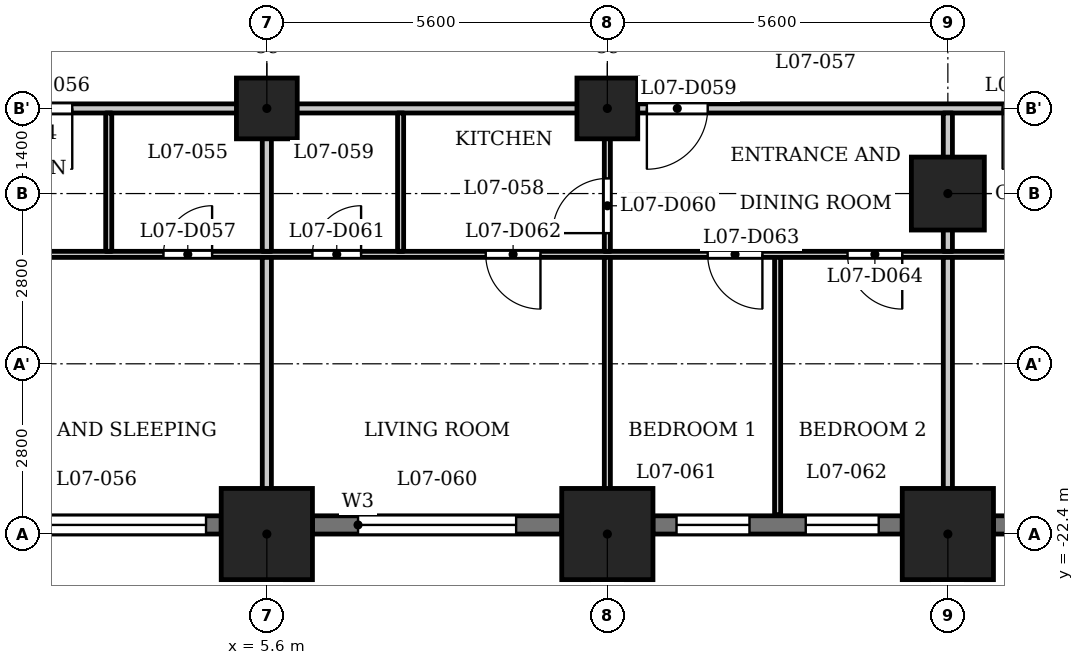
"""IFC4 building model, lengths in metres.
Left out: names, types, materials, properties, quantities, classifications, styles, units other than length and angle.
Written with IfcOpenShell. Run it as: python <this file> out.ifc"""

import sys

from ifc_helpers import new_model, si_unit, direction, frame, frame_2d, origin, origin_2d, place, context, subcontext, project, spatial, rectangle, extrude, element, fill, save


model = new_model("IFC4")
c1 = context("Model", 3, precision=1e-05, world=origin(), true_north=direction((0.0, 1.0)))
c2 = subcontext(c1, "Body", "Model", "MODEL_VIEW")
j1 = project(units=[si_unit("LENGTHUNIT", "METRE"), si_unit("PLANEANGLEUNIT", "RADIAN")], contexts=[c1])
p1 = place(None, origin())
s1 = spatial("IfcSite", under=j1, at=p1, CompositionType="ELEMENT")
p2 = place(p1, origin())
s2 = spatial("IfcBuilding", under=s1, at=p2, CompositionType="ELEMENT")
p3 = place(p2, frame((0.0, 0.0, 34.0)))
s3 = spatial("IfcBuildingStorey", under=s2, at=p3, CompositionType="ELEMENT", Elevation=34.0)
for number, where, z_axis, x_axis in (
    (1, (5.6, -22.4, 0.0), (0.0, 0.0, 1.0), (1.0, 0.0, 0.0)),
    (2, (11.2, -22.4, 0.0), (0.0, 0.0, 1.0), (1.0, 0.0, 0.0)),
    (3, (16.8, -22.4, 0.0), (0.0, 0.0, 1.0), (1.0, 0.0, 0.0)),
):
    element("IfcColumn", number, at=place(p3, frame(where, z_axis=z_axis, x_axis=x_axis)), inside=s3, PredefinedType="COLUMN", context=c2, shape_type="SweptSolid", body=[
        extrude(rectangle(XDim=1.5, YDim=1.5, at=origin_2d()), origin(), (0.0, 0.0, 1.0), 3.5),
    ])
p4 = place(p3, frame((16.8, -16.8, 0.0), z_axis=(0.0, 0.0, 1.0), x_axis=(1.0, 0.0, 0.0)))
e4 = element("IfcColumn", 4, at=p4, inside=s3, PredefinedType="COLUMN", context=c2, shape_type="SweptSolid", body=[
    extrude(rectangle(XDim=1.2, YDim=1.2, at=origin_2d()), origin(), (0.0, 0.0, 1.0), 3.5),
])
for number, where, z_axis, x_axis in (
    (5, (5.6, -15.4, 0.0), (0.0, 0.0, 1.0), (1.0, 0.0, 0.0)),
    (6, (11.2, -15.4, 0.0), (0.0, 0.0, 1.0), (1.0, 0.0, 0.0)),
):
    element("IfcColumn", number, at=place(p3, frame(where, z_axis=z_axis, x_axis=x_axis)), inside=s3, PredefinedType="COLUMN", context=c2, shape_type="SweptSolid", body=[
        extrude(rectangle(XDim=1.0, YDim=1.0, at=origin_2d()), origin(), (0.0, 0.0, 1.0), 3.5),
    ])
p5 = place(p3, frame((0.75, -22.25, 0.0), z_axis=(0.0, 0.0, 1.0), x_axis=(1.0, 0.0, 0.0)))
e7 = element("IfcWall", 7, at=p5, inside=s3, PredefinedType="SOLIDWALL", context=c2, shape_type="SweptSolid", body=[
    extrude(rectangle(XDim=4.1, YDim=0.3, at=frame_2d((2.05, 0.0))), origin(), (0.0, 0.0, 1.0), 2.35),
])
p6 = place(p5, frame((0.25, 0.0, 1.2)))
e8 = element("IfcOpeningElement", 8, at=p6, cuts=e7, PredefinedType="OPENING", context=c2, shape_type="SweptSolid", body=[
    extrude(rectangle(XDim=3.6, YDim=0.95, at=frame_2d((1.8, 0.475))), frame((0.0, 0.16, 0.0), z_axis=(0.0, -1.0, 0.0), x_axis=(1.0, 0.0, 0.0)), (0.0, 0.0, 1.0), 0.32),
])
p7 = place(p3, frame((6.35, -22.25, 0.0), z_axis=(0.0, 0.0, 1.0), x_axis=(1.0, 0.0, 0.0)))
e9 = element("IfcWall", 9, at=p7, inside=s3, PredefinedType="SOLIDWALL", context=c2, shape_type="SweptSolid", body=[
    extrude(rectangle(XDim=4.1, YDim=0.3, at=frame_2d((2.05, 0.0))), origin(), (0.0, 0.0, 1.0), 2.35),
])
p8 = place(p7, frame((0.75, 0.0, 0.9)))
e10 = element("IfcOpeningElement", 10, at=p8, cuts=e9, PredefinedType="OPENING", context=c2, shape_type="SweptSolid", body=[
    extrude(rectangle(XDim=2.6, YDim=1.25, at=frame_2d((1.3, 0.625))), frame((0.0, 0.16, 0.0), z_axis=(0.0, -1.0, 0.0), x_axis=(1.0, 0.0, 0.0)), (0.0, 0.0, 1.0), 0.32),
])
p9 = place(p3, frame((11.95, -22.25, 0.0), z_axis=(0.0, 0.0, 1.0), x_axis=(1.0, 0.0, 0.0)))
e11 = element("IfcWall", 11, at=p9, inside=s3, PredefinedType="SOLIDWALL", context=c2, shape_type="SweptSolid", body=[
    extrude(rectangle(XDim=4.1, YDim=0.3, at=frame_2d((2.05, 0.0))), origin(), (0.0, 0.0, 1.0), 2.35),
])
p10 = place(p9, frame((0.387, 0.0, 0.6)))
e12 = element("IfcOpeningElement", 12, at=p10, cuts=e11, PredefinedType="OPENING", context=c2, shape_type="SweptSolid", body=[
    extrude(rectangle(XDim=1.2, YDim=1.55, at=frame_2d((0.6, 0.775))), frame((0.0, 0.16, 0.0), z_axis=(0.0, -1.0, 0.0), x_axis=(1.0, 0.0, 0.0)), (0.0, 0.0, 1.0), 0.32),
])
p11 = place(p9, frame((2.512, 0.0, 0.6)))
e13 = element("IfcOpeningElement", 13, at=p11, cuts=e11, PredefinedType="OPENING", context=c2, shape_type="SweptSolid", body=[
    extrude(rectangle(XDim=1.2, YDim=1.55, at=frame_2d((0.6, 0.775))), frame((0.0, 0.16, 0.0), z_axis=(0.0, -1.0, 0.0), x_axis=(1.0, 0.0, 0.0)), (0.0, 0.0, 1.0), 0.32),
])
p12 = place(p3, frame((17.55, -22.25, 0.0), z_axis=(0.0, 0.0, 1.0), x_axis=(1.0, 0.0, 0.0)))
e14 = element("IfcWall", 14, at=p12, inside=s3, PredefinedType="SOLIDWALL", context=c2, shape_type="SweptSolid", body=[
    extrude(rectangle(XDim=2.45, YDim=0.3, at=frame_2d((1.225, 0.0))), origin(), (0.0, 0.0, 1.0), 2.35),
])
p13 = place(p12, frame((0.625, 0.0, 0.6)))
e15 = element("IfcOpeningElement", 15, at=p13, cuts=e14, PredefinedType="OPENING", context=c2, shape_type="SweptSolid", body=[
    extrude(rectangle(XDim=1.2, YDim=1.55, at=frame_2d((0.6, 0.775))), frame((0.0, 0.16, 0.0), z_axis=(0.0, -1.0, 0.0), x_axis=(1.0, 0.0, 0.0)), (0.0, 0.0, 1.0), 0.32),
])
p14 = place(p3, frame((-26.394, -17.8, 0.0), z_axis=(0.0, 0.0, 1.0), x_axis=(1.0, 0.0, 0.0)))
e16 = element("IfcWall", 16, at=p14, inside=s3, PredefinedType="PARTITIONING", context=c2, shape_type="SweptSolid", body=[
    extrude(rectangle(XDim=53.126, YDim=0.1, at=frame_2d((26.563, 0.0))), origin(), (0.0, 0.0, 1.0), 3.2),
])
p15 = place(p14, frame((0.794, 0.0, 0.0)))
e17 = element("IfcOpeningElement", 17, at=p15, cuts=e16, PredefinedType="OPENING", context=c2, shape_type="SweptSolid", body=[
    extrude(rectangle(XDim=0.8, YDim=2.1, at=frame_2d((0.4, 1.05))), frame((0.0, 0.06, 0.0), z_axis=(0.0, -1.0, 0.0), x_axis=(1.0, 0.0, 0.0)), (0.0, 0.0, 1.0), 0.12),
])
p16 = place(p14, frame((5.644, 0.0, 0.0)))
e18 = element("IfcOpeningElement", 18, at=p16, cuts=e16, PredefinedType="OPENING", context=c2, shape_type="SweptSolid", body=[
    extrude(rectangle(XDim=0.9, YDim=2.1, at=frame_2d((0.45, 1.05))), frame((0.0, 0.06, 0.0), z_axis=(0.0, -1.0, 0.0), x_axis=(1.0, 0.0, 0.0)), (0.0, 0.0, 1.0), 0.12),
])
p17 = place(p14, frame((13.244, 0.0, 0.0)))
e19 = element("IfcOpeningElement", 19, at=p17, cuts=e16, PredefinedType="OPENING", context=c2, shape_type="SweptSolid", body=[
    extrude(rectangle(XDim=0.8, YDim=2.1, at=frame_2d((0.4, 1.05))), frame((0.0, 0.06, 0.0), z_axis=(0.0, -1.0, 0.0), x_axis=(1.0, 0.0, 0.0)), (0.0, 0.0, 1.0), 0.12),
])
p18 = place(p14, frame((11.494, 0.0, 0.0)))
e20 = element("IfcOpeningElement", 20, at=p18, cuts=e16, PredefinedType="OPENING", context=c2, shape_type="SweptSolid", body=[
    extrude(rectangle(XDim=0.9, YDim=2.1, at=frame_2d((0.45, 1.05))), frame((0.0, 0.06, 0.0), z_axis=(0.0, -1.0, 0.0), x_axis=(1.0, 0.0, 0.0)), (0.0, 0.0, 1.0), 0.12),
])
p19 = place(p14, frame((19.344, 0.0, 0.0)))
e21 = element("IfcOpeningElement", 21, at=p19, cuts=e16, PredefinedType="OPENING", context=c2, shape_type="SweptSolid", body=[
    extrude(rectangle(XDim=0.8, YDim=2.1, at=frame_2d((0.4, 1.05))), frame((0.0, 0.06, 0.0), z_axis=(0.0, -1.0, 0.0), x_axis=(1.0, 0.0, 0.0)), (0.0, 0.0, 1.0), 0.12),
])
p20 = place(p14, frame((16.094, 0.0, 0.0)))
e22 = element("IfcOpeningElement", 22, at=p20, cuts=e16, PredefinedType="OPENING", context=c2, shape_type="SweptSolid", body=[
    extrude(rectangle(XDim=0.9, YDim=2.1, at=frame_2d((0.45, 1.05))), frame((0.0, 0.06, 0.0), z_axis=(0.0, -1.0, 0.0), x_axis=(1.0, 0.0, 0.0)), (0.0, 0.0, 1.0), 0.12),
])
p21 = place(p14, frame((24.944, 0.0, 0.0)))
e23 = element("IfcOpeningElement", 23, at=p21, cuts=e16, PredefinedType="OPENING", context=c2, shape_type="SweptSolid", body=[
    extrude(rectangle(XDim=0.8, YDim=2.1, at=frame_2d((0.4, 1.05))), frame((0.0, 0.06, 0.0), z_axis=(0.0, -1.0, 0.0), x_axis=(1.0, 0.0, 0.0)), (0.0, 0.0, 1.0), 0.12),
])
p22 = place(p14, frame((22.444, 0.0, 0.0)))
e24 = element("IfcOpeningElement", 24, at=p22, cuts=e16, PredefinedType="OPENING", context=c2, shape_type="SweptSolid", body=[
    extrude(rectangle(XDim=0.9, YDim=2.1, at=frame_2d((0.45, 1.05))), frame((0.0, 0.06, 0.0), z_axis=(0.0, -1.0, 0.0), x_axis=(1.0, 0.0, 0.0)), (0.0, 0.0, 1.0), 0.12),
])
p23 = place(p14, frame((30.294, 0.0, 0.0)))
e25 = element("IfcOpeningElement", 25, at=p23, cuts=e16, PredefinedType="OPENING", context=c2, shape_type="SweptSolid", body=[
    extrude(rectangle(XDim=0.8, YDim=2.1, at=frame_2d((0.4, 1.05))), frame((0.0, 0.06, 0.0), z_axis=(0.0, -1.0, 0.0), x_axis=(1.0, 0.0, 0.0)), (0.0, 0.0, 1.0), 0.12),
])
p24 = place(p14, frame((26.794, 0.0, 0.0)))
e26 = element("IfcOpeningElement", 26, at=p24, cuts=e16, PredefinedType="OPENING", context=c2, shape_type="SweptSolid", body=[
    extrude(rectangle(XDim=0.9, YDim=2.1, at=frame_2d((0.45, 1.05))), frame((0.0, 0.06, 0.0), z_axis=(0.0, -1.0, 0.0), x_axis=(1.0, 0.0, 0.0)), (0.0, 0.0, 1.0), 0.12),
])
p25 = place(p14, frame((32.744, 0.0, 0.0)))
e27 = element("IfcOpeningElement", 27, at=p25, cuts=e16, PredefinedType="OPENING", context=c2, shape_type="SweptSolid", body=[
    extrude(rectangle(XDim=0.8, YDim=2.1, at=frame_2d((0.4, 1.05))), frame((0.0, 0.06, 0.0), z_axis=(0.0, -1.0, 0.0), x_axis=(1.0, 0.0, 0.0)), (0.0, 0.0, 1.0), 0.12),
])
p26 = place(p14, frame((35.594, 0.0, 0.0)))
e28 = element("IfcOpeningElement", 28, at=p26, cuts=e16, PredefinedType="OPENING", context=c2, shape_type="SweptSolid", body=[
    extrude(rectangle(XDim=0.9, YDim=2.1, at=frame_2d((0.45, 1.05))), frame((0.0, 0.06, 0.0), z_axis=(0.0, -1.0, 0.0), x_axis=(1.0, 0.0, 0.0)), (0.0, 0.0, 1.0), 0.12),
])
p27 = place(p14, frame((39.244, 0.0, 0.0)))
e29 = element("IfcOpeningElement", 29, at=p27, cuts=e16, PredefinedType="OPENING", context=c2, shape_type="SweptSolid", body=[
    extrude(rectangle(XDim=0.9, YDim=2.1, at=frame_2d((0.45, 1.05))), frame((0.0, 0.06, 0.0), z_axis=(0.0, -1.0, 0.0), x_axis=(1.0, 0.0, 0.0)), (0.0, 0.0, 1.0), 0.12),
])
p28 = place(p14, frame((41.544, 0.0, 0.0)))
e30 = element("IfcOpeningElement", 30, at=p28, cuts=e16, PredefinedType="OPENING", context=c2, shape_type="SweptSolid", body=[
    extrude(rectangle(XDim=0.9, YDim=2.1, at=frame_2d((0.45, 1.05))), frame((0.0, 0.06, 0.0), z_axis=(0.0, -1.0, 0.0), x_axis=(1.0, 0.0, 0.0)), (0.0, 0.0, 1.0), 0.12),
])
p29 = place(p14, frame((49.362, 0.0, 0.0)))
e31 = element("IfcOpeningElement", 31, at=p29, cuts=e16, PredefinedType="OPENING", context=c2, shape_type="SweptSolid", body=[
    extrude(rectangle(XDim=0.8, YDim=2.1, at=frame_2d((0.4, 1.05))), frame((0.0, 0.06, 0.0), z_axis=(0.0, -1.0, 0.0), x_axis=(1.0, 0.0, 0.0)), (0.0, 0.0, 1.0), 0.12),
])
p30 = place(p14, frame((45.094, 0.0, 0.0)))
e32 = element("IfcOpeningElement", 32, at=p30, cuts=e16, PredefinedType="OPENING", context=c2, shape_type="SweptSolid", body=[
    extrude(rectangle(XDim=0.9, YDim=2.1, at=frame_2d((0.45, 1.05))), frame((0.0, 0.06, 0.0), z_axis=(0.0, -1.0, 0.0), x_axis=(1.0, 0.0, 0.0)), (0.0, 0.0, 1.0), 0.12),
])
p31 = place(p3, frame((-27.484, -15.4, 0.0), z_axis=(0.0, 0.0, 1.0), x_axis=(1.0, 0.0, 0.0)))
e33 = element("IfcWall", 33, at=p31, inside=s3, PredefinedType="PARTITIONING", context=c2, shape_type="SweptSolid", body=[
    extrude(rectangle(XDim=54.968, YDim=0.15, at=frame_2d((27.484, 0.0))), origin(), (0.0, 0.0, 1.0), 3.2),
])
p32 = place(p31, frame((5.734, 0.0, 0.0)))
e34 = element("IfcOpeningElement", 34, at=p32, cuts=e33, PredefinedType="OPENING", context=c2, shape_type="SweptSolid", body=[
    extrude(rectangle(XDim=1.0, YDim=2.1, at=frame_2d((0.5, 1.05))), frame((0.0, 0.085, 0.0), z_axis=(0.0, -1.0, 0.0), x_axis=(1.0, 0.0, 0.0)), (0.0, 0.0, 1.0), 0.17),
])
p33 = place(p31, frame((11.584, 0.0, 0.0)))
e35 = element("IfcOpeningElement", 35, at=p33, cuts=e33, PredefinedType="OPENING", context=c2, shape_type="SweptSolid", body=[
    extrude(rectangle(XDim=1.0, YDim=2.1, at=frame_2d((0.5, 1.05))), frame((0.0, 0.085, 0.0), z_axis=(0.0, -1.0, 0.0), x_axis=(1.0, 0.0, 0.0)), (0.0, 0.0, 1.0), 0.17),
])
p34 = place(p31, frame((17.184, 0.0, 0.0)))
e36 = element("IfcOpeningElement", 36, at=p34, cuts=e33, PredefinedType="OPENING", context=c2, shape_type="SweptSolid", body=[
    extrude(rectangle(XDim=1.0, YDim=2.1, at=frame_2d((0.5, 1.05))), frame((0.0, 0.085, 0.0), z_axis=(0.0, -1.0, 0.0), x_axis=(1.0, 0.0, 0.0)), (0.0, 0.0, 1.0), 0.17),
])
p35 = place(p31, frame((22.534, 0.0, 0.0)))
e37 = element("IfcOpeningElement", 37, at=p35, cuts=e33, PredefinedType="OPENING", context=c2, shape_type="SweptSolid", body=[
    extrude(rectangle(XDim=1.0, YDim=2.1, at=frame_2d((0.5, 1.05))), frame((0.0, 0.085, 0.0), z_axis=(0.0, -1.0, 0.0), x_axis=(1.0, 0.0, 0.0)), (0.0, 0.0, 1.0), 0.17),
])
p36 = place(p31, frame((28.884, 0.0, 0.0)))
e38 = element("IfcOpeningElement", 38, at=p36, cuts=e33, PredefinedType="OPENING", context=c2, shape_type="SweptSolid", body=[
    extrude(rectangle(XDim=1.0, YDim=2.1, at=frame_2d((0.5, 1.05))), frame((0.0, 0.085, 0.0), z_axis=(0.0, -1.0, 0.0), x_axis=(1.0, 0.0, 0.0)), (0.0, 0.0, 1.0), 0.17),
])
p37 = place(p31, frame((39.334, 0.0, 0.0)))
e39 = element("IfcOpeningElement", 39, at=p37, cuts=e33, PredefinedType="OPENING", context=c2, shape_type="SweptSolid", body=[
    extrude(rectangle(XDim=1.0, YDim=2.1, at=frame_2d((0.5, 1.05))), frame((0.0, 0.085, 0.0), z_axis=(0.0, -1.0, 0.0), x_axis=(1.0, 0.0, 0.0)), (0.0, 0.0, 1.0), 0.17),
])
p38 = place(p31, frame((45.184, 0.0, 0.0)))
e40 = element("IfcOpeningElement", 40, at=p38, cuts=e33, PredefinedType="OPENING", context=c2, shape_type="SweptSolid", body=[
    extrude(rectangle(XDim=1.0, YDim=2.1, at=frame_2d((0.5, 1.05))), frame((0.0, 0.085, 0.0), z_axis=(0.0, -1.0, 0.0), x_axis=(1.0, 0.0, 0.0)), (0.0, 0.0, 1.0), 0.17),
])
p39 = place(p3, frame((3.0, -17.75, 0.0), z_axis=(0.0, 0.0, 1.0), x_axis=(0.0, 1.0, 0.0)))
e41 = element("IfcWall", 41, at=p39, inside=s3, PredefinedType="PARTITIONING", context=c2, shape_type="SweptSolid", body=[
    extrude(rectangle(XDim=2.275, YDim=0.1, at=frame_2d((1.137, 0.0))), origin(), (0.0, 0.0, 1.0), 3.2),
])
p40 = place(p3, frame((5.6, -23.13, 0.0), z_axis=(0.0, 0.0, 1.0), x_axis=(0.0, 1.0, 0.0)))
e42 = element("IfcWall", 42, at=p40, inside=s3, PredefinedType="PARTITIONING", context=c2, shape_type="SweptSolid", body=[
    extrude(rectangle(XDim=5.28, YDim=0.15, at=frame_2d((2.64, 0.0))), origin(), (0.0, 0.0, 1.0), 3.2),
])
p41 = place(p3, frame((5.6, -17.75, 0.0), z_axis=(0.0, 0.0, 1.0), x_axis=(0.0, 1.0, 0.0)))
e43 = element("IfcWall", 43, at=p41, inside=s3, PredefinedType="PARTITIONING", context=c2, shape_type="SweptSolid", body=[
    extrude(rectangle(XDim=2.275, YDim=0.15, at=frame_2d((1.137, 0.0))), origin(), (0.0, 0.0, 1.0), 3.2),
])
p42 = place(p3, frame((7.8, -17.75, 0.0), z_axis=(0.0, 0.0, 1.0), x_axis=(0.0, 1.0, 0.0)))
e44 = element("IfcWall", 44, at=p42, inside=s3, PredefinedType="PARTITIONING", context=c2, shape_type="SweptSolid", body=[
    extrude(rectangle(XDim=2.275, YDim=0.1, at=frame_2d((1.137, 0.0))), origin(), (0.0, 0.0, 1.0), 3.2),
])
p43 = place(p3, frame((11.2, -23.13, 0.0), z_axis=(0.0, 0.0, 1.0), x_axis=(0.0, 1.0, 0.0)))
e45 = element("IfcWall", 45, at=p43, inside=s3, PredefinedType="PARTITIONING", context=c2, shape_type="SweptSolid", body=[
    extrude(rectangle(XDim=5.28, YDim=0.1, at=frame_2d((2.64, 0.0))), origin(), (0.0, 0.0, 1.0), 3.2),
])
p44 = place(p3, frame((11.2, -17.75, 0.0), z_axis=(0.0, 0.0, 1.0), x_axis=(0.0, 1.0, 0.0)))
e46 = element("IfcWall", 46, at=p44, inside=s3, PredefinedType="PARTITIONING", context=c2, shape_type="SweptSolid", body=[
    extrude(rectangle(XDim=2.275, YDim=0.1, at=frame_2d((1.137, 0.0))), origin(), (0.0, 0.0, 1.0), 3.2),
])
p45 = place(p44, frame((0.299, 0.0, 0.0)))
e47 = element("IfcOpeningElement", 47, at=p45, cuts=e46, PredefinedType="OPENING", context=c2, shape_type="SweptSolid", body=[
    extrude(rectangle(XDim=0.9, YDim=2.1, at=frame_2d((0.45, 1.05))), frame((0.0, 0.06, 0.0), z_axis=(0.0, -1.0, 0.0), x_axis=(1.0, 0.0, 0.0)), (0.0, 0.0, 1.0), 0.12),
])
p46 = place(p3, frame((14.0, -22.08, 0.0), z_axis=(0.0, 0.0, 1.0), x_axis=(0.0, 1.0, 0.0)))
e48 = element("IfcWall", 48, at=p46, inside=s3, PredefinedType="PARTITIONING", context=c2, shape_type="SweptSolid", body=[
    extrude(rectangle(XDim=4.23, YDim=0.1, at=frame_2d((2.115, 0.0))), origin(), (0.0, 0.0, 1.0), 3.2),
])
p47 = place(p3, frame((16.8, -23.13, 0.0), z_axis=(0.0, 0.0, 1.0), x_axis=(0.0, 1.0, 0.0)))
e49 = element("IfcWall", 49, at=p47, inside=s3, PredefinedType="PARTITIONING", context=c2, shape_type="SweptSolid", body=[
    extrude(rectangle(XDim=5.28, YDim=0.15, at=frame_2d((2.64, 0.0))), origin(), (0.0, 0.0, 1.0), 3.2),
])
p48 = place(p3, frame((16.8, -17.75, 0.0), z_axis=(0.0, 0.0, 1.0), x_axis=(0.0, 1.0, 0.0)))
e50 = element("IfcWall", 50, at=p48, inside=s3, PredefinedType="PARTITIONING", context=c2, shape_type="SweptSolid", body=[
    extrude(rectangle(XDim=2.275, YDim=0.15, at=frame_2d((1.137, 0.0))), origin(), (0.0, 0.0, 1.0), 3.2),
])
p49 = place(p36, origin())
e51 = element("IfcDoor", 51, at=p49, inside=s3, OperationType="SINGLE_SWING_RIGHT", PredefinedType="DOOR", context=c2, shape_type="SweptSolid", body=[
    extrude(rectangle(XDim=1.0, YDim=2.1, at=frame_2d((0.5, 1.05))), frame((0.0, 0.025, 0.0), z_axis=(0.0, -1.0, 0.0), x_axis=(1.0, 0.0, 0.0)), (0.0, 0.0, 1.0), 0.05),
])
fill(e38, e51)
p50 = place(p23, origin())
e52 = element("IfcDoor", 52, at=p50, inside=s3, OperationType="SINGLE_SWING_LEFT", PredefinedType="DOOR", context=c2, shape_type="SweptSolid", body=[
    extrude(rectangle(XDim=0.8, YDim=2.1, at=frame_2d((0.4, 1.05))), frame((0.0, 0.025, 0.0), z_axis=(0.0, -1.0, 0.0), x_axis=(1.0, 0.0, 0.0)), (0.0, 0.0, 1.0), 0.05),
])
fill(e25, e52)
p51 = place(p37, origin())
e53 = element("IfcDoor", 53, at=p51, inside=s3, OperationType="SINGLE_SWING_LEFT", PredefinedType="DOOR", context=c2, shape_type="SweptSolid", body=[
    extrude(rectangle(XDim=1.0, YDim=2.1, at=frame_2d((0.5, 1.05))), frame((0.0, 0.025, 0.0), z_axis=(0.0, -1.0, 0.0), x_axis=(1.0, 0.0, 0.0)), (0.0, 0.0, 1.0), 0.05),
])
fill(e39, e53)
p52 = place(p45, origin())
e54 = element("IfcDoor", 54, at=p52, inside=s3, OperationType="SINGLE_SWING_RIGHT", PredefinedType="DOOR", context=c2, shape_type="SweptSolid", body=[
    extrude(rectangle(XDim=0.9, YDim=2.1, at=frame_2d((0.45, 1.05))), frame((0.0, 0.025, 0.0), z_axis=(0.0, -1.0, 0.0), x_axis=(1.0, 0.0, 0.0)), (0.0, 0.0, 1.0), 0.05),
])
fill(e47, e54)
p53 = place(p25, origin())
e55 = element("IfcDoor", 55, at=p53, inside=s3, OperationType="SINGLE_SWING_LEFT", PredefinedType="DOOR", context=c2, shape_type="SweptSolid", body=[
    extrude(rectangle(XDim=0.8, YDim=2.1, at=frame_2d((0.4, 1.05))), frame((0.0, 0.025, 0.0), z_axis=(0.0, -1.0, 0.0), x_axis=(1.0, 0.0, 0.0)), (0.0, 0.0, 1.0), 0.05),
])
fill(e27, e55)
p54 = place(p26, origin())
e56 = element("IfcDoor", 56, at=p54, inside=s3, OperationType="SINGLE_SWING_RIGHT", PredefinedType="DOOR", context=c2, shape_type="SweptSolid", body=[
    extrude(rectangle(XDim=0.9, YDim=2.1, at=frame_2d((0.45, 1.05))), frame((0.0, 0.025, 0.0), z_axis=(0.0, -1.0, 0.0), x_axis=(1.0, 0.0, 0.0)), (0.0, 0.0, 1.0), 0.05),
])
fill(e28, e56)
p55 = place(p27, origin())
e57 = element("IfcDoor", 57, at=p55, inside=s3, OperationType="SINGLE_SWING_RIGHT", PredefinedType="DOOR", context=c2, shape_type="SweptSolid", body=[
    extrude(rectangle(XDim=0.9, YDim=2.1, at=frame_2d((0.45, 1.05))), frame((0.0, 0.025, 0.0), z_axis=(0.0, -1.0, 0.0), x_axis=(1.0, 0.0, 0.0)), (0.0, 0.0, 1.0), 0.05),
])
fill(e29, e57)
p56 = place(p28, origin())
e58 = element("IfcDoor", 58, at=p56, inside=s3, OperationType="SINGLE_SWING_RIGHT", PredefinedType="DOOR", context=c2, shape_type="SweptSolid", body=[
    extrude(rectangle(XDim=0.9, YDim=2.1, at=frame_2d((0.45, 1.05))), frame((0.0, 0.025, 0.0), z_axis=(0.0, -1.0, 0.0), x_axis=(1.0, 0.0, 0.0)), (0.0, 0.0, 1.0), 0.05),
])
fill(e30, e58)
p57 = place(p38, origin())
e59 = element("IfcDoor", 59, at=p57, inside=s3, OperationType="SINGLE_SWING_LEFT", PredefinedType="DOOR", context=c2, shape_type="SweptSolid", body=[
    extrude(rectangle(XDim=1.0, YDim=2.1, at=frame_2d((0.5, 1.05))), frame((0.0, 0.025, 0.0), z_axis=(0.0, -1.0, 0.0), x_axis=(1.0, 0.0, 0.0)), (0.0, 0.0, 1.0), 0.05),
])
fill(e40, e59)
p58 = place(p6, origin())
e60 = element("IfcWindow", 60, at=p58, inside=s3, PartitioningType="SINGLE_PANEL", PredefinedType="WINDOW", context=c2, shape_type="SweptSolid", body=[
    extrude(rectangle(XDim=3.6, YDim=0.95, at=frame_2d((1.8, 0.475))), frame((0.0, 0.03, 0.0), z_axis=(0.0, -1.0, 0.0), x_axis=(1.0, 0.0, 0.0)), (0.0, 0.0, 1.0), 0.06),
])
fill(e8, e60)
p59 = place(p8, origin())
e61 = element("IfcWindow", 61, at=p59, inside=s3, PartitioningType="SINGLE_PANEL", PredefinedType="WINDOW", context=c2, shape_type="SweptSolid", body=[
    extrude(rectangle(XDim=2.6, YDim=1.25, at=frame_2d((1.3, 0.625))), frame((0.0, 0.03, 0.0), z_axis=(0.0, -1.0, 0.0), x_axis=(1.0, 0.0, 0.0)), (0.0, 0.0, 1.0), 0.06),
])
fill(e10, e61)
p60 = place(p10, origin())
e62 = element("IfcWindow", 62, at=p60, inside=s3, PartitioningType="SINGLE_PANEL", PredefinedType="WINDOW", context=c2, shape_type="SweptSolid", body=[
    extrude(rectangle(XDim=1.2, YDim=1.55, at=frame_2d((0.6, 0.775))), frame((0.0, 0.03, 0.0), z_axis=(0.0, -1.0, 0.0), x_axis=(1.0, 0.0, 0.0)), (0.0, 0.0, 1.0), 0.06),
])
fill(e12, e62)
p61 = place(p11, origin())
e63 = element("IfcWindow", 63, at=p61, inside=s3, PartitioningType="SINGLE_PANEL", PredefinedType="WINDOW", context=c2, shape_type="SweptSolid", body=[
    extrude(rectangle(XDim=1.2, YDim=1.55, at=frame_2d((0.6, 0.775))), frame((0.0, 0.03, 0.0), z_axis=(0.0, -1.0, 0.0), x_axis=(1.0, 0.0, 0.0)), (0.0, 0.0, 1.0), 0.06),
])
fill(e13, e63)
save(model, sys.argv[1])
